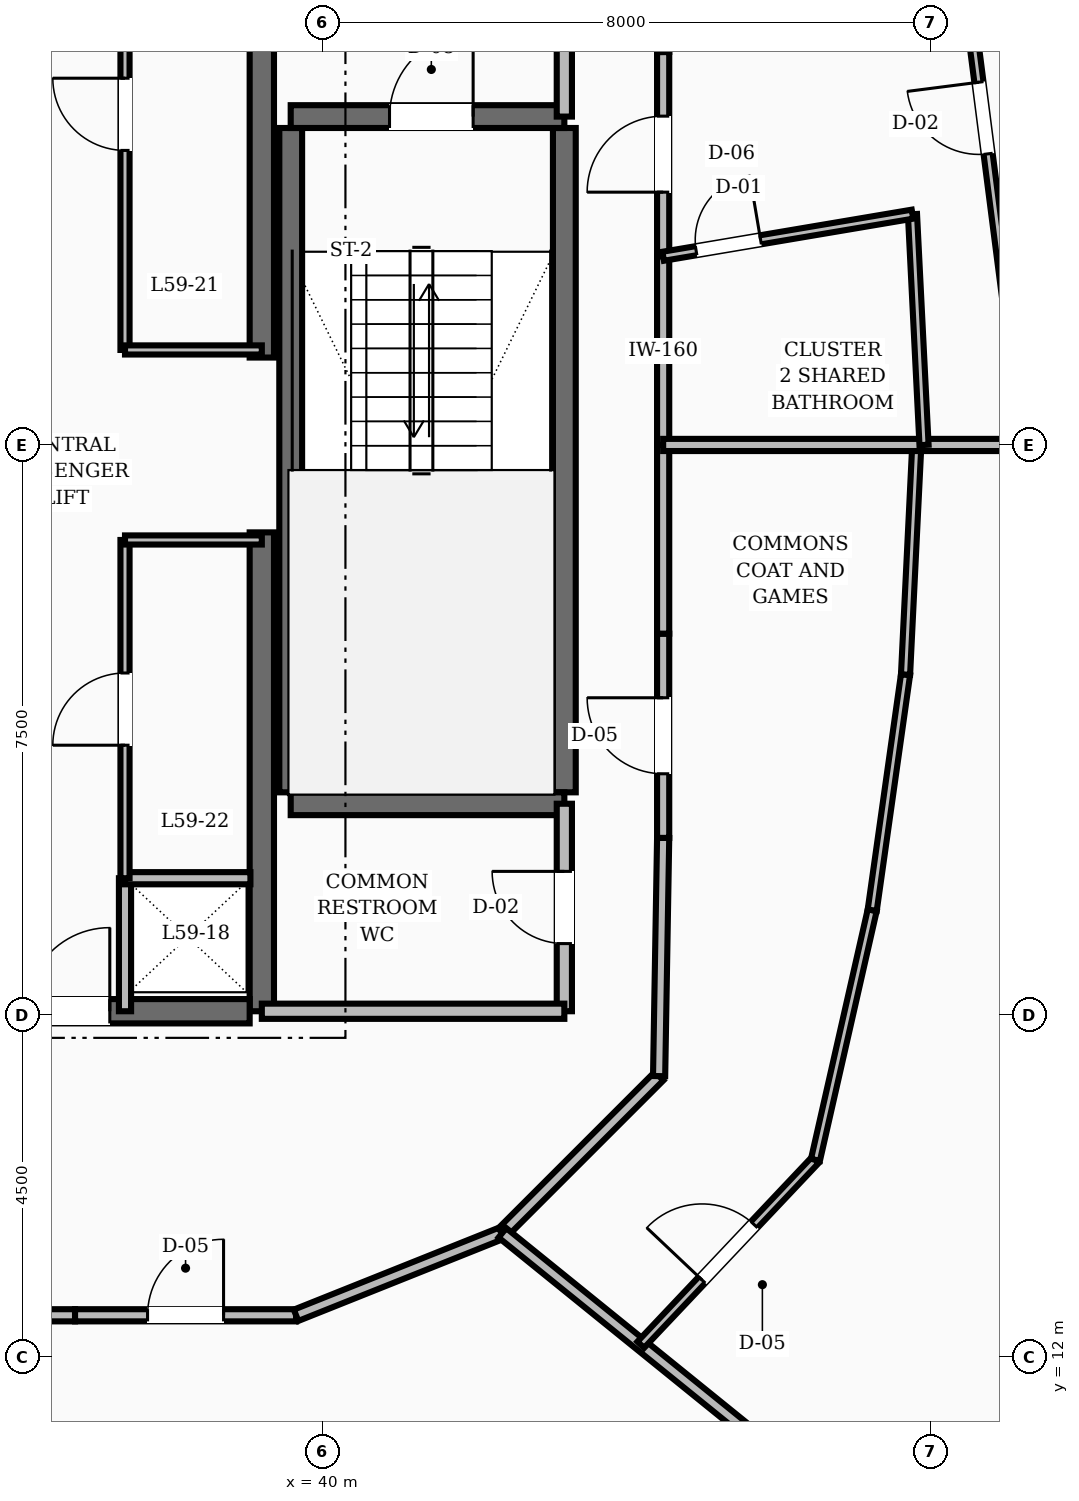
"""IFC4 building model, lengths in metres.
Left out: names, types, materials, properties, quantities, classifications, styles, units other than length and angle.
Written with IfcOpenShell. Run it as: python <this file> out.ifc"""

import sys

from ifc_helpers import new_model, si_unit, direction, frame, frame_2d, origin, place, context, subcontext, project, spatial, rectangle, extrude, element, fill, save


model = new_model("IFC4")
c1 = context("Model", 3, precision=1e-05, world=origin(), true_north=direction((0.0, 1.0)))
c2 = subcontext(c1, "Body", "Model", "MODEL_VIEW")
j1 = project(units=[si_unit("LENGTHUNIT", "METRE"), si_unit("PLANEANGLEUNIT", "RADIAN")], contexts=[c1])
p1 = place(None, origin())
s1 = spatial("IfcSite", under=j1, at=p1, CompositionType="ELEMENT")
p2 = place(p1, origin())
s2 = spatial("IfcBuilding", under=s1, at=p2, CompositionType="ELEMENT")
p3 = place(p2, frame((0.0, 0.0, 229.2)))
s3 = spatial("IfcBuildingStorey", under=s2, at=p3, CompositionType="ELEMENT", Elevation=229.2)
for number, where, z_axis, x_axis in (
    (1, (39.2, 16.55, 0.0), (0.0, 0.0, 1.0), (0.0, 1.0, 0.0)),
    (2, (39.2, 25.15, 0.0), (0.0, 0.0, 1.0), (0.0, 1.0, 0.0)),
):
    element("IfcWall", number, at=place(p3, frame(where, z_axis=z_axis, x_axis=x_axis)), inside=s3, PredefinedType="SHEAR", context=c2, shape_type="SweptSolid", body=[
        extrude(rectangle(XDim=6.3, YDim=0.32, at=frame_2d((3.15, 0.0))), origin(), (0.0, 0.0, 1.0), 3.6),
    ])
p4 = place(p3, frame((35.8, 16.55, 0.0), z_axis=(0.0, 0.0, 1.0), x_axis=(1.0, 0.0, 0.0)))
e3 = element("IfcWall", 3, at=p4, inside=s3, PredefinedType="SHEAR", context=c2, shape_type="SweptSolid", body=[
    extrude(rectangle(XDim=3.24, YDim=0.32, at=frame_2d((1.62, 0.0))), origin(), (0.0, 0.0, 1.0), 3.6),
])
p5 = place(p4, frame((0.3, 0.0, 0.0)))
e4 = element("IfcOpeningElement", 4, at=p5, cuts=e3, PredefinedType="OPENING", context=c2, shape_type="SweptSolid", body=[
    extrude(rectangle(XDim=1.1, YDim=2.1, at=frame_2d((0.55, 1.05))), frame((0.0, 0.17, 0.0), z_axis=(0.0, -1.0, 0.0), x_axis=(1.0, 0.0, 0.0)), (0.0, 0.0, 1.0), 0.34),
])
for number, where, z_axis, x_axis in (
    (5, (43.18, 19.43, 0.0), (0.0, 0.0, 1.0), (0.0, 1.0, 0.0)),
    (6, (39.58, 19.43, 0.0), (0.0, 0.0, 1.0), (0.0, 1.0, 0.0)),
):
    element("IfcWall", number, at=place(p3, frame(where, z_axis=z_axis, x_axis=x_axis)), inside=s3, PredefinedType="SHEAR", context=c2, shape_type="SweptSolid", body=[
        extrude(rectangle(XDim=8.74, YDim=0.3, at=frame_2d((4.37, 0.0))), origin(), (0.0, 0.0, 1.0), 3.6),
    ])
p6 = place(p3, frame((39.58, 19.28, 0.0), z_axis=(0.0, 0.0, 1.0), x_axis=(1.0, 0.0, 0.0)))
e7 = element("IfcWall", 7, at=p6, inside=s3, PredefinedType="SHEAR", context=c2, shape_type="SweptSolid", body=[
    extrude(rectangle(XDim=3.6, YDim=0.3, at=frame_2d((1.8, 0.0))), origin(), (0.0, 0.0, 1.0), 3.6),
])
p7 = place(p3, frame((39.58, 28.32, 0.0), z_axis=(0.0, 0.0, 1.0), x_axis=(1.0, 0.0, 0.0)))
e8 = element("IfcWall", 8, at=p7, inside=s3, PredefinedType="SHEAR", context=c2, shape_type="SweptSolid", body=[
    extrude(rectangle(XDim=3.6, YDim=0.3, at=frame_2d((1.8, 0.0))), origin(), (0.0, 0.0, 1.0), 3.6),
])
p8 = place(p7, frame((1.3, 0.0, 0.0)))
e9 = element("IfcOpeningElement", 9, at=p8, cuts=e8, PredefinedType="OPENING", context=c2, shape_type="SweptSolid", body=[
    extrude(rectangle(XDim=1.1, YDim=2.1, at=frame_2d((0.55, 1.05))), frame((0.0, 0.16, 0.0), z_axis=(0.0, -1.0, 0.0), x_axis=(1.0, 0.0, 0.0)), (0.0, 0.0, 1.0), 0.32),
])
p9 = place(p3, frame((43.18, 28.32, 0.0), z_axis=(0.0, 0.0, 1.0), x_axis=(0.0, 1.0, 0.0)))
e10 = element("IfcWall", 10, at=p9, inside=s3, PredefinedType="SOLIDWALL", context=c2, shape_type="SweptSolid", body=[
    extrude(rectangle(XDim=3.13, YDim=0.2, at=frame_2d((1.565, 0.0))), origin(), (0.0, 0.0, 1.0), 2.87),
])
p10 = place(p9, frame((1.015, 0.0, 0.0)))
e11 = element("IfcOpeningElement", 11, at=p10, cuts=e10, PredefinedType="OPENING", context=c2, shape_type="SweptSolid", body=[
    extrude(rectangle(XDim=1.1, YDim=2.1, at=frame_2d((0.55, 1.05))), frame((0.0, 0.11, 0.0), z_axis=(0.0, -1.0, 0.0), x_axis=(1.0, 0.0, 0.0)), (0.0, 0.0, 1.0), 0.22),
])
p11 = place(p3, frame((43.18, 16.55, 0.0), z_axis=(0.0, 0.0, 1.0), x_axis=(0.0, 1.0, 0.0)))
e12 = element("IfcWall", 12, at=p11, inside=s3, PredefinedType="SOLIDWALL", context=c2, shape_type="SweptSolid", body=[
    extrude(rectangle(XDim=2.73, YDim=0.2, at=frame_2d((1.365, 0.0))), origin(), (0.0, 0.0, 1.0), 2.87),
])
p12 = place(p11, frame((0.89, 0.0, 0.0)))
e13 = element("IfcOpeningElement", 13, at=p12, cuts=e12, PredefinedType="OPENING", context=c2, shape_type="SweptSolid", body=[
    extrude(rectangle(XDim=0.95, YDim=2.1, at=frame_2d((0.475, 1.05))), frame((0.0, 0.11, 0.0), z_axis=(0.0, -1.0, 0.0), x_axis=(1.0, 0.0, 0.0)), (0.0, 0.0, 1.0), 0.22),
])
p13 = place(p3, frame((39.2, 16.55, 0.0), z_axis=(0.0, 0.0, 1.0), x_axis=(1.0, 0.0, 0.0)))
e14 = element("IfcWall", 14, at=p13, inside=s3, PredefinedType="SOLIDWALL", context=c2, shape_type="SweptSolid", body=[
    extrude(rectangle(XDim=3.98, YDim=0.2, at=frame_2d((1.99, 0.0))), origin(), (0.0, 0.0, 1.0), 2.87),
])
p14 = place(p3, frame((37.4, 16.55, 0.0), z_axis=(0.0, 0.0, 1.0), x_axis=(0.0, 1.0, 0.0)))
e15 = element("IfcWall", 15, at=p14, inside=s3, PredefinedType="SOLIDWALL", context=c2, shape_type="SweptSolid", body=[
    extrude(rectangle(XDim=1.75, YDim=0.16, at=frame_2d((0.875, 0.0))), origin(), (0.0, 0.0, 1.0), 2.87),
])
p15 = place(p3, frame((37.4, 18.3, 0.0), z_axis=(0.0, 0.0, 1.0), x_axis=(1.0, 0.0, 0.0)))
e16 = element("IfcWall", 16, at=p15, inside=s3, PredefinedType="SOLIDWALL", context=c2, shape_type="SweptSolid", body=[
    extrude(rectangle(XDim=1.65, YDim=0.16, at=frame_2d((0.825, 0.0))), origin(), (0.0, 0.0, 1.0), 2.87),
])
p16 = place(p3, frame((37.4, 25.25, 0.0), z_axis=(0.0, 0.0, 1.0), x_axis=(0.0, 1.0, 0.0)))
e17 = element("IfcWall", 17, at=p16, inside=s3, PredefinedType="PARTITIONING", context=c2, shape_type="SweptSolid", body=[
    extrude(rectangle(XDim=6.2, YDim=0.12, at=frame_2d((3.1, 0.0))), origin(), (0.0, 0.0, 1.0), 2.87),
])
p17 = place(p16, frame((2.625, 0.0, 0.0)))
e18 = element("IfcOpeningElement", 18, at=p17, cuts=e17, PredefinedType="OPENING", context=c2, shape_type="SweptSolid", body=[
    extrude(rectangle(XDim=0.95, YDim=2.1, at=frame_2d((0.475, 1.05))), frame((0.0, 0.07, 0.0), z_axis=(0.0, -1.0, 0.0), x_axis=(1.0, 0.0, 0.0)), (0.0, 0.0, 1.0), 0.14),
])
p18 = place(p3, frame((37.4, 25.25, 0.0), z_axis=(0.0, 0.0, 1.0), x_axis=(1.0, 0.0, 0.0)))
e19 = element("IfcWall", 19, at=p18, inside=s3, PredefinedType="PARTITIONING", context=c2, shape_type="SweptSolid", body=[
    extrude(rectangle(XDim=1.8, YDim=0.12, at=frame_2d((0.9, 0.0))), origin(), (0.0, 0.0, 1.0), 2.87),
])
p19 = place(p3, frame((37.4, 18.3, 0.0), z_axis=(0.0, 0.0, 1.0), x_axis=(0.0, 1.0, 0.0)))
e20 = element("IfcWall", 20, at=p19, inside=s3, PredefinedType="PARTITIONING", context=c2, shape_type="SweptSolid", body=[
    extrude(rectangle(XDim=4.45, YDim=0.12, at=frame_2d((2.225, 0.0))), origin(), (0.0, 0.0, 1.0), 2.87),
])
p20 = place(p19, frame((1.75, 0.0, 0.0)))
e21 = element("IfcOpeningElement", 21, at=p20, cuts=e20, PredefinedType="OPENING", context=c2, shape_type="SweptSolid", body=[
    extrude(rectangle(XDim=0.95, YDim=2.1, at=frame_2d((0.475, 1.05))), frame((0.0, 0.07, 0.0), z_axis=(0.0, -1.0, 0.0), x_axis=(1.0, 0.0, 0.0)), (0.0, 0.0, 1.0), 0.14),
])
p21 = place(p3, frame((37.4, 22.75, 0.0), z_axis=(0.0, 0.0, 1.0), x_axis=(1.0, 0.0, 0.0)))
e22 = element("IfcWall", 22, at=p21, inside=s3, PredefinedType="PARTITIONING", context=c2, shape_type="SweptSolid", body=[
    extrude(rectangle(XDim=1.8, YDim=0.12, at=frame_2d((0.9, 0.0))), origin(), (0.0, 0.0, 1.0), 2.87),
])
p22 = place(p3, frame((44.48, 24.0, 0.0), z_axis=(0.0, 0.0, 1.0), x_axis=(0.0, 1.0, 0.0)))
e23 = element("IfcWall", 23, at=p22, inside=s3, PredefinedType="SOLIDWALL", context=c2, shape_type="SweptSolid", body=[
    extrude(rectangle(XDim=2.482, YDim=0.16, at=frame_2d((1.241, 0.0))), origin(), (0.0, 0.0, 1.0), 2.87),
])
p23 = place(p3, frame((44.48, 26.482, 0.0), z_axis=(0.0, 0.0, 1.0), x_axis=(0.0, 1.0, 0.0)))
e24 = element("IfcWall", 24, at=p23, inside=s3, PredefinedType="SOLIDWALL", context=c2, shape_type="SweptSolid", body=[
    extrude(rectangle(XDim=2.687, YDim=0.16, at=frame_2d((1.344, 0.0))), origin(), (0.0, 0.0, 1.0), 2.87),
])
p24 = place(p23, frame((0.844, 0.0, 0.0)))
e25 = element("IfcOpeningElement", 25, at=p24, cuts=e24, PredefinedType="OPENING", context=c2, shape_type="SweptSolid", body=[
    extrude(rectangle(XDim=1.0, YDim=2.1, at=frame_2d((0.5, 1.05))), frame((0.0, 0.09, 0.0), z_axis=(0.0, -1.0, 0.0), x_axis=(1.0, 0.0, 0.0)), (0.0, 0.0, 1.0), 0.18),
])
p25 = place(p3, frame((44.48, 29.169, 0.0), z_axis=(0.0, 0.0, 1.0), x_axis=(-0.016981035134, 0.999855811828, 0.0)))
e26 = element("IfcWall", 26, at=p25, inside=s3, PredefinedType="SOLIDWALL", context=c2, shape_type="SweptSolid", body=[
    extrude(rectangle(XDim=3.134, YDim=0.16, at=frame_2d((1.567, 0.0))), origin(), (0.0, 0.0, 1.0), 2.87),
])
p26 = place(p3, frame((34.278, 12.55, 0.0), z_axis=(0.0, 0.0, 1.0), x_axis=(1.0, 0.0, 0.0)))
e27 = element("IfcWall", 27, at=p26, inside=s3, PredefinedType="SOLIDWALL", context=c2, shape_type="SweptSolid", body=[
    extrude(rectangle(XDim=2.465, YDim=0.16, at=frame_2d((1.232, 0.0))), origin(), (0.0, 0.0, 1.0), 2.87),
])
p27 = place(p3, frame((36.743, 12.55, 0.0), z_axis=(0.0, 0.0, 1.0), x_axis=(1.0, 0.0, 0.0)))
e28 = element("IfcWall", 28, at=p27, inside=s3, PredefinedType="SOLIDWALL", context=c2, shape_type="SweptSolid", body=[
    extrude(rectangle(XDim=2.908, YDim=0.16, at=frame_2d((1.454, 0.0))), origin(), (0.0, 0.0, 1.0), 2.87),
])
p28 = place(p27, frame((0.954, 0.0, 0.0)))
e29 = element("IfcOpeningElement", 29, at=p28, cuts=e28, PredefinedType="OPENING", context=c2, shape_type="SweptSolid", body=[
    extrude(rectangle(XDim=1.0, YDim=2.1, at=frame_2d((0.5, 1.05))), frame((0.0, 0.09, 0.0), z_axis=(0.0, -1.0, 0.0), x_axis=(1.0, 0.0, 0.0)), (0.0, 0.0, 1.0), 0.18),
])
p29 = place(p3, frame((39.651, 12.55, 0.0), z_axis=(0.0, 0.0, 1.0), x_axis=(0.92856882165, 0.371160266542, 0.0)))
e30 = element("IfcWall", 30, at=p29, inside=s3, PredefinedType="SOLIDWALL", context=c2, shape_type="SweptSolid", body=[
    extrude(rectangle(XDim=2.923, YDim=0.16, at=frame_2d((1.461, 0.0))), origin(), (0.0, 0.0, 1.0), 2.87),
])
p30 = place(p3, frame((42.365, 13.635, 0.0), z_axis=(0.0, 0.0, 1.0), x_axis=(0.707106781187, 0.707106781187, 0.0)))
e31 = element("IfcWall", 31, at=p30, inside=s3, PredefinedType="SOLIDWALL", context=c2, shape_type="SweptSolid", body=[
    extrude(rectangle(XDim=2.916, YDim=0.16, at=frame_2d((1.458, 0.0))), origin(), (0.0, 0.0, 1.0), 2.87),
])
p31 = place(p3, frame((44.427, 15.697, 0.0), z_axis=(0.0, 0.0, 1.0), x_axis=(0.016981035134, 0.999855811828, 0.0)))
e32 = element("IfcWall", 32, at=p31, inside=s3, PredefinedType="SOLIDWALL", context=c2, shape_type="SweptSolid", body=[
    extrude(rectangle(XDim=3.134, YDim=0.16, at=frame_2d((1.567, 0.0))), origin(), (0.0, 0.0, 1.0), 2.87),
])
p32 = place(p3, frame((44.48, 18.831, 0.0), z_axis=(0.0, 0.0, 1.0), x_axis=(0.0, 1.0, 0.0)))
e33 = element("IfcWall", 33, at=p32, inside=s3, PredefinedType="SOLIDWALL", context=c2, shape_type="SweptSolid", body=[
    extrude(rectangle(XDim=2.687, YDim=0.16, at=frame_2d((1.344, 0.0))), origin(), (0.0, 0.0, 1.0), 2.87),
])
p33 = place(p32, frame((0.844, 0.0, 0.0)))
e34 = element("IfcOpeningElement", 34, at=p33, cuts=e33, PredefinedType="OPENING", context=c2, shape_type="SweptSolid", body=[
    extrude(rectangle(XDim=1.0, YDim=2.1, at=frame_2d((0.5, 1.05))), frame((0.0, 0.09, 0.0), z_axis=(0.0, -1.0, 0.0), x_axis=(1.0, 0.0, 0.0)), (0.0, 0.0, 1.0), 0.18),
])
p34 = place(p3, frame((44.48, 21.518, 0.0), z_axis=(0.0, 0.0, 1.0), x_axis=(0.0, 1.0, 0.0)))
e35 = element("IfcWall", 35, at=p34, inside=s3, PredefinedType="SOLIDWALL", context=c2, shape_type="SweptSolid", body=[
    extrude(rectangle(XDim=2.482, YDim=0.16, at=frame_2d((1.241, 0.0))), origin(), (0.0, 0.0, 1.0), 2.87),
])
p35 = place(p3, frame((42.365, 13.635, 0.0), z_axis=(0.0, 0.0, 1.0), x_axis=(0.777377556826, -0.629034286938, 0.0)))
e36 = element("IfcWall", 36, at=p35, inside=s3, PredefinedType="SOLIDWALL", context=c2, shape_type="SweptSolid", body=[
    extrude(rectangle(XDim=6.641, YDim=0.16, at=frame_2d((3.32, 0.0))), origin(), (0.0, 0.0, 1.0), 2.87),
])
p36 = place(p3, frame((44.185, 12.162, 0.0), z_axis=(0.0, 0.0, 1.0), x_axis=(0.686726331668, 0.726916051132, 0.0)))
e37 = element("IfcWall", 37, at=p36, inside=s3, PredefinedType="PARTITIONING", context=c2, shape_type="SweptSolid", body=[
    extrude(rectangle(XDim=3.347, YDim=0.12, at=frame_2d((1.674, 0.0))), origin(), (0.0, 0.0, 1.0), 2.87),
])
p37 = place(p36, frame((1.174, 0.0, 0.0)))
e38 = element("IfcOpeningElement", 38, at=p37, cuts=e37, PredefinedType="OPENING", context=c2, shape_type="SweptSolid", body=[
    extrude(rectangle(XDim=1.0, YDim=2.1, at=frame_2d((0.5, 1.05))), frame((0.0, 0.07, 0.0), z_axis=(0.0, -1.0, 0.0), x_axis=(1.0, 0.0, 0.0)), (0.0, 0.0, 1.0), 0.14),
])
p38 = place(p3, frame((46.484, 14.595, 0.0), z_axis=(0.0, 0.0, 1.0), x_axis=(0.221671233184, 0.975121461346, 0.0)))
e39 = element("IfcWall", 39, at=p38, inside=s3, PredefinedType="PARTITIONING", context=c2, shape_type="SweptSolid", body=[
    extrude(rectangle(XDim=3.368, YDim=0.12, at=frame_2d((1.684, 0.0))), origin(), (0.0, 0.0, 1.0), 2.87),
])
p39 = place(p3, frame((47.23, 17.879, 0.0), z_axis=(0.0, 0.0, 1.0), x_axis=(0.139990883937, 0.990152792459, 0.0)))
e40 = element("IfcWall", 40, at=p39, inside=s3, PredefinedType="PARTITIONING", context=c2, shape_type="SweptSolid", body=[
    extrude(rectangle(XDim=3.13, YDim=0.12, at=frame_2d((1.565, 0.0))), origin(), (0.0, 0.0, 1.0), 2.87),
])
p40 = place(p3, frame((47.669, 20.979, 0.0), z_axis=(0.0, 0.0, 1.0), x_axis=(0.048995554465, 0.998798996617, 0.0)))
e41 = element("IfcWall", 41, at=p40, inside=s3, PredefinedType="PARTITIONING", context=c2, shape_type="SweptSolid", body=[
    extrude(rectangle(XDim=3.025, YDim=0.12, at=frame_2d((1.512, 0.0))), origin(), (0.0, 0.0, 1.0), 2.87),
])
p41 = place(p3, frame((44.48, 24.0, 0.0), z_axis=(0.0, 0.0, 1.0), x_axis=(1.0, 0.0, 0.0)))
e42 = element("IfcWall", 42, at=p41, inside=s3, PredefinedType="SOLIDWALL", context=c2, shape_type="SweptSolid", body=[
    extrude(rectangle(XDim=9.484, YDim=0.16, at=frame_2d((4.742, 0.0))), origin(), (0.0, 0.0, 1.0), 2.87),
])
p42 = place(p3, frame((47.912, 24.0, 0.0), z_axis=(0.0, 0.0, 1.0), x_axis=(-0.050029736668, 0.998747728633, 0.0)))
e43 = element("IfcWall", 43, at=p42, inside=s3, PredefinedType="PARTITIONING", context=c2, shape_type="SweptSolid", body=[
    extrude(rectangle(XDim=3.04, YDim=0.12, at=frame_2d((1.52, 0.0))), origin(), (0.0, 0.0, 1.0), 2.87),
])
p43 = place(p3, frame((44.48, 26.482, 0.0), z_axis=(0.0, 0.0, 1.0), x_axis=(0.986036559249, 0.166528987937, 0.0)))
e44 = element("IfcWall", 44, at=p43, inside=s3, PredefinedType="PARTITIONING", context=c2, shape_type="SweptSolid", body=[
    extrude(rectangle(XDim=3.326, YDim=0.12, at=frame_2d((1.663, 0.0))), origin(), (0.0, 0.0, 1.0), 2.87),
])
p44 = place(p43, frame((0.44, 0.0, 0.0)))
e45 = element("IfcOpeningElement", 45, at=p44, cuts=e44, PredefinedType="OPENING", context=c2, shape_type="SweptSolid", body=[
    extrude(rectangle(XDim=0.86, YDim=2.1, at=frame_2d((0.43, 1.05))), frame((0.0, 0.07, 0.0), z_axis=(0.0, -1.0, 0.0), x_axis=(1.0, 0.0, 0.0)), (0.0, 0.0, 1.0), 0.14),
])
p45 = place(p3, frame((49.247, 24.0, 0.0), z_axis=(0.0, 0.0, 1.0), x_axis=(-0.12730280127, 0.991863900336, 0.0)))
e46 = element("IfcWall", 46, at=p45, inside=s3, PredefinedType="PARTITIONING", context=c2, shape_type="SweptSolid", body=[
    extrude(rectangle(XDim=6.582, YDim=0.12, at=frame_2d((3.291, 0.0))), origin(), (0.0, 0.0, 1.0), 2.87),
])
p46 = place(p45, frame((3.861, 0.0, 0.0)))
e47 = element("IfcOpeningElement", 47, at=p46, cuts=e46, PredefinedType="OPENING", context=c2, shape_type="SweptSolid", body=[
    extrude(rectangle(XDim=0.95, YDim=2.1, at=frame_2d((0.475, 1.05))), frame((0.0, 0.07, 0.0), z_axis=(0.0, -1.0, 0.0), x_axis=(1.0, 0.0, 0.0)), (0.0, 0.0, 1.0), 0.14),
])
p47 = place(p8, origin())
e48 = element("IfcDoor", 48, at=p47, inside=s3, OperationType="SINGLE_SWING_RIGHT", PredefinedType="DOOR", context=c2, shape_type="SweptSolid", body=[
    extrude(rectangle(XDim=1.1, YDim=2.1, at=frame_2d((0.55, 1.05))), frame((0.0, 0.025, 0.0), z_axis=(0.0, -1.0, 0.0), x_axis=(1.0, 0.0, 0.0)), (0.0, 0.0, 1.0), 0.05),
])
fill(e9, e48)
p48 = place(p12, origin())
e49 = element("IfcDoor", 49, at=p48, inside=s3, OperationType="SINGLE_SWING_RIGHT", PredefinedType="DOOR", context=c2, shape_type="SweptSolid", body=[
    extrude(rectangle(XDim=0.95, YDim=2.1, at=frame_2d((0.475, 1.05))), frame((0.0, 0.025, 0.0), z_axis=(0.0, -1.0, 0.0), x_axis=(1.0, 0.0, 0.0)), (0.0, 0.0, 1.0), 0.05),
])
fill(e13, e49)
p49 = place(p5, origin())
e50 = element("IfcDoor", 50, at=p49, inside=s3, OperationType="SINGLE_SWING_RIGHT", PredefinedType="DOOR", context=c2, shape_type="SweptSolid", body=[
    extrude(rectangle(XDim=1.1, YDim=2.1, at=frame_2d((0.55, 1.05))), frame((0.0, 0.025, 0.0), z_axis=(0.0, -1.0, 0.0), x_axis=(1.0, 0.0, 0.0)), (0.0, 0.0, 1.0), 0.05),
])
fill(e4, e50)
p50 = place(p17, origin())
e51 = element("IfcDoor", 51, at=p50, inside=s3, OperationType="SINGLE_SWING_RIGHT", PredefinedType="DOOR", context=c2, shape_type="SweptSolid", body=[
    extrude(rectangle(XDim=0.95, YDim=2.1, at=frame_2d((0.475, 1.05))), frame((0.0, 0.025, 0.0), z_axis=(0.0, -1.0, 0.0), x_axis=(1.0, 0.0, 0.0)), (0.0, 0.0, 1.0), 0.05),
])
fill(e18, e51)
p51 = place(p20, origin())
e52 = element("IfcDoor", 52, at=p51, inside=s3, OperationType="SINGLE_SWING_LEFT", PredefinedType="DOOR", context=c2, shape_type="SweptSolid", body=[
    extrude(rectangle(XDim=0.95, YDim=2.1, at=frame_2d((0.475, 1.05))), frame((0.0, 0.025, 0.0), z_axis=(0.0, -1.0, 0.0), x_axis=(1.0, 0.0, 0.0)), (0.0, 0.0, 1.0), 0.05),
])
fill(e21, e52)
p52 = place(p33, origin())
e53 = element("IfcDoor", 53, at=p52, inside=s3, OperationType="SINGLE_SWING_RIGHT", PredefinedType="DOOR", context=c2, shape_type="SweptSolid", body=[
    extrude(rectangle(XDim=1.0, YDim=2.1, at=frame_2d((0.5, 1.05))), frame((0.0, 0.025, 0.0), z_axis=(0.0, -1.0, 0.0), x_axis=(1.0, 0.0, 0.0)), (0.0, 0.0, 1.0), 0.05),
])
fill(e34, e53)
p53 = place(p37, origin())
e54 = element("IfcDoor", 54, at=p53, inside=s3, OperationType="SINGLE_SWING_LEFT", PredefinedType="DOOR", context=c2, shape_type="SweptSolid", body=[
    extrude(rectangle(XDim=1.0, YDim=2.1, at=frame_2d((0.5, 1.05))), frame((0.0, 0.025, 0.0), z_axis=(0.0, -1.0, 0.0), x_axis=(1.0, 0.0, 0.0)), (0.0, 0.0, 1.0), 0.05),
])
fill(e38, e54)
p54 = place(p44, origin())
e55 = element("IfcDoor", 55, at=p54, inside=s3, OperationType="SINGLE_SWING_RIGHT", PredefinedType="DOOR", context=c2, shape_type="SweptSolid", body=[
    extrude(rectangle(XDim=0.86, YDim=2.1, at=frame_2d((0.43, 1.05))), frame((0.0, 0.025, 0.0), z_axis=(0.0, -1.0, 0.0), x_axis=(1.0, 0.0, 0.0)), (0.0, 0.0, 1.0), 0.05),
])
fill(e45, e55)
p55 = place(p24, origin())
e56 = element("IfcDoor", 56, at=p55, inside=s3, OperationType="SINGLE_SWING_LEFT", PredefinedType="DOOR", context=c2, shape_type="SweptSolid", body=[
    extrude(rectangle(XDim=1.0, YDim=2.1, at=frame_2d((0.5, 1.05))), frame((0.0, 0.025, 0.0), z_axis=(0.0, -1.0, 0.0), x_axis=(1.0, 0.0, 0.0)), (0.0, 0.0, 1.0), 0.05),
])
fill(e25, e56)
p56 = place(p46, origin())
e57 = element("IfcDoor", 57, at=p56, inside=s3, OperationType="SINGLE_SWING_RIGHT", PredefinedType="DOOR", context=c2, shape_type="SweptSolid", body=[
    extrude(rectangle(XDim=0.95, YDim=2.1, at=frame_2d((0.475, 1.05))), frame((0.0, 0.025, 0.0), z_axis=(0.0, -1.0, 0.0), x_axis=(1.0, 0.0, 0.0)), (0.0, 0.0, 1.0), 0.05),
])
fill(e47, e57)
p57 = place(p28, origin())
e58 = element("IfcDoor", 58, at=p57, inside=s3, OperationType="SINGLE_SWING_RIGHT", PredefinedType="DOOR", context=c2, shape_type="SweptSolid", body=[
    extrude(rectangle(XDim=1.0, YDim=2.1, at=frame_2d((0.5, 1.05))), frame((0.0, 0.025, 0.0), z_axis=(0.0, -1.0, 0.0), x_axis=(1.0, 0.0, 0.0)), (0.0, 0.0, 1.0), 0.05),
])
fill(e29, e58)
save(model, sys.argv[1])
